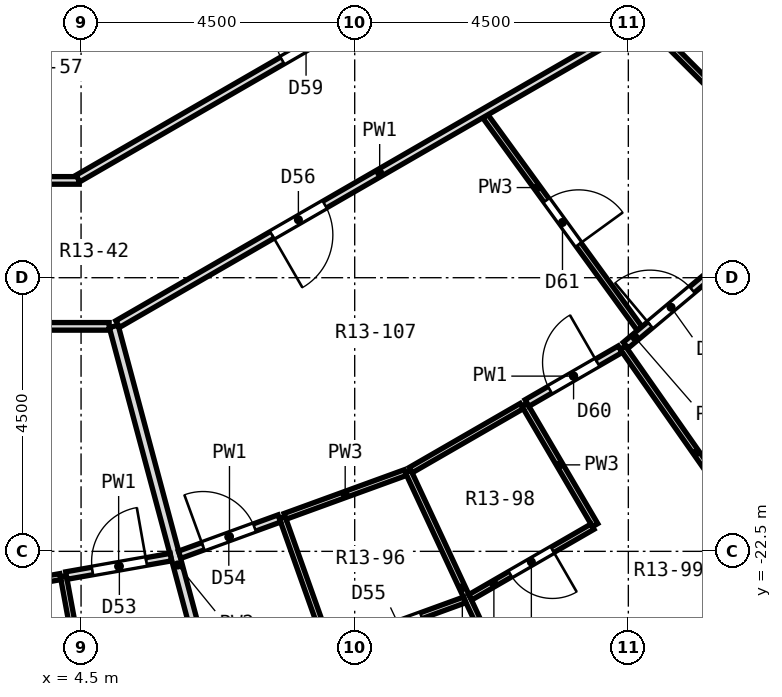
"""IFC4 building model, lengths in metres.
Left out: names, types, materials, properties, quantities, classifications, styles, units other than length and angle.
Written with IfcOpenShell. Run it as: python <this file> out.ifc"""

import sys

from ifc_helpers import new_model, si_unit, direction, frame, frame_2d, origin, place, context, subcontext, project, spatial, rectangle, extrude, element, fill, save


model = new_model("IFC4")
c1 = context("Model", 3, precision=1e-05, world=origin(), true_north=direction((0.0, 1.0)))
c2 = subcontext(c1, "Body", "Model", "MODEL_VIEW")
j1 = project(units=[si_unit("LENGTHUNIT", "METRE"), si_unit("PLANEANGLEUNIT", "RADIAN")], contexts=[c1])
p1 = place(None, origin())
s1 = spatial("IfcSite", under=j1, at=p1, CompositionType="ELEMENT")
p2 = place(p1, origin())
s2 = spatial("IfcBuilding", under=s1, at=p2, CompositionType="ELEMENT")
p3 = place(p2, frame((0.0, 0.0, 65.9)))
s3 = spatial("IfcBuildingStorey", under=s2, at=p3, CompositionType="ELEMENT", Elevation=65.9)
p4 = place(p3, frame((12.63, -25.721, 0.0), z_axis=(0.0, 0.0, 1.0), x_axis=(0.86603124159, 0.499989888488, 0.0)))
e1 = element("IfcWall", 1, at=p4, inside=s3, PredefinedType="SOLIDWALL", context=c2, shape_type="SweptSolid", body=[
    extrude(rectangle(XDim=3.846, YDim=0.6, at=frame_2d((1.923, 0.0))), origin(), (0.0, 0.0, 1.0), 2.75),
])
p5 = place(p4, frame((0.723, 0.0, 0.9)))
e2 = element("IfcOpeningElement", 2, at=p5, cuts=e1, PredefinedType="OPENING", context=c2, shape_type="SweptSolid", body=[
    extrude(rectangle(XDim=2.4, YDim=1.8, at=frame_2d((1.2, 0.9))), frame((0.0, 0.312, 0.0), z_axis=(0.0, -1.0, 0.0), x_axis=(1.0, 0.0, 0.0)), (0.0, 0.0, 1.0), 0.624),
])
p6 = place(p3, frame((4.209, -22.907, 0.0), z_axis=(0.0, 0.0, 1.0), x_axis=(0.180884135875, -0.983504412491, 0.0)))
e3 = element("IfcWall", 3, at=p6, inside=s3, PredefinedType="PARTITIONING", context=c2, shape_type="SweptSolid", body=[
    extrude(rectangle(XDim=2.3, YDim=0.1, at=frame_2d((1.15, 0.0))), origin(), (0.0, 0.0, 1.0), 2.75),
])
p7 = place(p3, frame((5.037, -18.8, 0.0), z_axis=(0.0, 0.0, 1.0), x_axis=(0.258808663505, -0.96592860797, 0.0)))
e4 = element("IfcWall", 4, at=p7, inside=s3, PredefinedType="PARTITIONING", context=c2, shape_type="SweptSolid", body=[
    extrude(rectangle(XDim=8.127, YDim=0.15, at=frame_2d((4.063, 0.0))), origin(), (0.0, 0.0, 1.0), 2.75),
])
p8 = place(p3, frame((7.808, -21.942, 0.0), z_axis=(0.0, 0.0, 1.0), x_axis=(0.335206501266, -0.942144681835, 0.0)))
e5 = element("IfcWall", 5, at=p8, inside=s3, PredefinedType="PARTITIONING", context=c2, shape_type="SweptSolid", body=[
    extrude(rectangle(XDim=2.3, YDim=0.1, at=frame_2d((1.15, 0.0))), origin(), (0.0, 0.0, 1.0), 2.75),
])
p9 = place(p3, frame((9.88, -21.188, 0.0), z_axis=(0.0, 0.0, 1.0), x_axis=(0.422631582156, -0.906301575506, 0.0)))
e6 = element("IfcWall", 6, at=p9, inside=s3, PredefinedType="PARTITIONING", context=c2, shape_type="SweptSolid", body=[
    extrude(rectangle(XDim=4.212, YDim=0.1, at=frame_2d((2.106, 0.0))), origin(), (0.0, 0.0, 1.0), 2.75),
])
p10 = place(p3, frame((11.79, -20.086, 0.0), z_axis=(0.0, 0.0, 1.0), x_axis=(0.506212585002, -0.862408730699, 0.0)))
e7 = element("IfcWall", 7, at=p10, inside=s3, PredefinedType="PARTITIONING", context=c2, shape_type="SweptSolid", body=[
    extrude(rectangle(XDim=2.3, YDim=0.1, at=frame_2d((1.15, 0.0))), origin(), (0.0, 0.0, 1.0), 2.75),
])
p11 = place(p3, frame((13.409, -19.151, 0.0), z_axis=(0.0, 0.0, 1.0), x_axis=(0.573446781639, -0.819242814206, 0.0)))
e8 = element("IfcWall", 8, at=p11, inside=s3, PredefinedType="PARTITIONING", context=c2, shape_type="SweptSolid", body=[
    extrude(rectangle(XDim=4.211, YDim=0.1, at=frame_2d((2.106, 0.0))), origin(), (0.0, 0.0, 1.0), 2.75),
])
p12 = place(p3, frame((11.148, -15.344, 0.0), z_axis=(0.0, 0.0, 1.0), x_axis=(0.587899330934, -0.8089340991, 0.0)))
e9 = element("IfcWall", 9, at=p12, inside=s3, PredefinedType="PARTITIONING", context=c2, shape_type="SweptSolid", body=[
    extrude(rectangle(XDim=4.318, YDim=0.1, at=frame_2d((2.159, 0.0))), origin(), (0.0, 0.0, 1.0), 2.75),
])
p13 = place(p12, frame((1.709, 0.0, 0.0)))
e10 = element("IfcOpeningElement", 10, at=p13, cuts=e9, PredefinedType="OPENING", context=c2, shape_type="SweptSolid", body=[
    extrude(rectangle(XDim=0.9, YDim=2.1, at=frame_2d((0.45, 1.05))), frame((0.0, 0.062, 0.0), z_axis=(0.0, -1.0, 0.0), x_axis=(1.0, 0.0, 0.0)), (0.0, 0.0, 1.0), 0.124),
])
p14 = place(p3, frame((13.763, -13.763, 0.0), z_axis=(0.0, 0.0, 1.0), x_axis=(0.707106781187, -0.707106781187, 0.0)))
e11 = element("IfcWall", 11, at=p14, inside=s3, PredefinedType="PARTITIONING", context=c2, shape_type="SweptSolid", body=[
    extrude(rectangle(XDim=2.174, YDim=0.1, at=frame_2d((1.087, 0.0))), origin(), (0.0, 0.0, 1.0), 2.75),
])
p15 = place(p3, frame((-4.975, -18.8, 0.0), z_axis=(0.0, 0.0, 1.0), x_axis=(1.0, 0.0, 0.0)))
e12 = element("IfcWall", 12, at=p15, inside=s3, PredefinedType="PARTITIONING", context=c2, shape_type="SweptSolid", body=[
    extrude(rectangle(XDim=9.937, YDim=0.125, at=frame_2d((4.968, 0.0))), origin(), (0.0, 0.0, 1.0), 2.75),
])
p16 = place(p3, frame((-4.332, -16.4, 0.0), z_axis=(0.0, 0.0, 1.0), x_axis=(1.0, 0.0, 0.0)))
e13 = element("IfcWall", 13, at=p16, inside=s3, PredefinedType="PARTITIONING", context=c2, shape_type="SweptSolid", body=[
    extrude(rectangle(XDim=8.798, YDim=0.125, at=frame_2d((4.399, 0.0))), origin(), (0.0, 0.0, 1.0), 2.75),
])
p17 = place(p16, frame((2.402, 0.0, 0.0)))
e14 = element("IfcOpeningElement", 14, at=p17, cuts=e13, PredefinedType="OPENING", context=c2, shape_type="SweptSolid", body=[
    extrude(rectangle(XDim=0.9, YDim=2.1, at=frame_2d((0.45, 1.05))), frame((0.0, 0.074, 0.0), z_axis=(0.0, -1.0, 0.0), x_axis=(1.0, 0.0, 0.0)), (0.0, 0.0, 1.0), 0.149),
])
p18 = place(p3, frame((2.087, -23.281, 0.0), z_axis=(0.0, 0.0, 1.0), x_axis=(0.984804573467, 0.173666208797, 0.0)))
e15 = element("IfcWall", 15, at=p18, inside=s3, PredefinedType="PARTITIONING", context=c2, shape_type="SweptSolid", body=[
    extrude(rectangle(XDim=2.104, YDim=0.1, at=frame_2d((1.052, 0.0))), origin(), (0.0, 0.0, 1.0), 2.75),
])
p19 = place(p3, frame((4.258, -22.898, 0.0), z_axis=(0.0, 0.0, 1.0), x_axis=(0.984792007097, 0.173737453525, 0.0)))
e16 = element("IfcWall", 16, at=p19, inside=s3, PredefinedType="PARTITIONING", context=c2, shape_type="SweptSolid", body=[
    extrude(rectangle(XDim=1.745, YDim=0.125, at=frame_2d((0.873, 0.0))), origin(), (0.0, 0.0, 1.0), 2.75),
])
p20 = place(p19, frame((0.435, 0.0, 0.0)))
e17 = element("IfcOpeningElement", 17, at=p20, cuts=e16, PredefinedType="OPENING", context=c2, shape_type="SweptSolid", body=[
    extrude(rectangle(XDim=0.9, YDim=2.1, at=frame_2d((0.45, 1.05))), frame((0.0, 0.074, 0.0), z_axis=(0.0, -1.0, 0.0), x_axis=(1.0, 0.0, 0.0)), (0.0, 0.0, 1.0), 0.149),
])
p21 = place(p3, frame((8.626, -24.092, 0.0), z_axis=(0.0, 0.0, 1.0), x_axis=(0.939814902169, 0.341683990936, 0.0)))
e18 = element("IfcWall", 18, at=p21, inside=s3, PredefinedType="PARTITIONING", context=c2, shape_type="SweptSolid", body=[
    extrude(rectangle(XDim=2.323, YDim=0.1, at=frame_2d((1.162, 0.0))), origin(), (0.0, 0.0, 1.0), 2.75),
])
p22 = place(p21, frame((0.761, 0.0, 0.0)))
e19 = element("IfcOpeningElement", 19, at=p22, cuts=e18, PredefinedType="OPENING", context=c2, shape_type="SweptSolid", body=[
    extrude(rectangle(XDim=0.8, YDim=2.1, at=frame_2d((0.4, 1.05))), frame((0.0, 0.062, 0.0), z_axis=(0.0, -1.0, 0.0), x_axis=(1.0, 0.0, 0.0)), (0.0, 0.0, 1.0), 0.124),
])
p23 = place(p3, frame((7.855, -21.925, 0.0), z_axis=(0.0, 0.0, 1.0), x_axis=(0.939725675468, 0.341929312674, 0.0)))
e20 = element("IfcWall", 20, at=p23, inside=s3, PredefinedType="PARTITIONING", context=c2, shape_type="SweptSolid", body=[
    extrude(rectangle(XDim=2.105, YDim=0.1, at=frame_2d((1.052, 0.0))), origin(), (0.0, 0.0, 1.0), 2.75),
])
p24 = place(p3, frame((6.122, -22.556, 0.0), z_axis=(0.0, 0.0, 1.0), x_axis=(0.939605351125, 0.342259819635, 0.0)))
e21 = element("IfcWall", 21, at=p24, inside=s3, PredefinedType="PARTITIONING", context=c2, shape_type="SweptSolid", body=[
    extrude(rectangle(XDim=1.745, YDim=0.125, at=frame_2d((0.873, 0.0))), origin(), (0.0, 0.0, 1.0), 2.75),
])
p25 = place(p24, frame((0.41, 0.0, 0.0)))
e22 = element("IfcOpeningElement", 22, at=p25, cuts=e21, PredefinedType="OPENING", context=c2, shape_type="SweptSolid", body=[
    extrude(rectangle(XDim=0.9, YDim=2.1, at=frame_2d((0.45, 1.05))), frame((0.0, 0.074, 0.0), z_axis=(0.0, -1.0, 0.0), x_axis=(1.0, 0.0, 0.0)), (0.0, 0.0, 1.0), 0.149),
])
p26 = place(p3, frame((10.899, -23.256, 0.0), z_axis=(0.0, 0.0, 1.0), x_axis=(0.865852932048, 0.500298610895, 0.0)))
e23 = element("IfcWall", 23, at=p26, inside=s3, PredefinedType="PARTITIONING", context=c2, shape_type="SweptSolid", body=[
    extrude(rectangle(XDim=2.323, YDim=0.1, at=frame_2d((1.161, 0.0))), origin(), (0.0, 0.0, 1.0), 2.75),
])
p27 = place(p26, frame((0.761, 0.0, 0.0)))
e24 = element("IfcOpeningElement", 24, at=p27, cuts=e23, PredefinedType="OPENING", context=c2, shape_type="SweptSolid", body=[
    extrude(rectangle(XDim=0.8, YDim=2.1, at=frame_2d((0.4, 1.05))), frame((0.0, 0.062, 0.0), z_axis=(0.0, -1.0, 0.0), x_axis=(1.0, 0.0, 0.0)), (0.0, 0.0, 1.0), 0.124),
])
p28 = place(p3, frame((9.923, -21.163, 0.0), z_axis=(0.0, 0.0, 1.0), x_axis=(0.866158552195, 0.499769309241, 0.0)))
e25 = element("IfcWall", 25, at=p28, inside=s3, PredefinedType="PARTITIONING", context=c2, shape_type="SweptSolid", body=[
    extrude(rectangle(XDim=2.105, YDim=0.1, at=frame_2d((1.052, 0.0))), origin(), (0.0, 0.0, 1.0), 2.75),
])
p29 = place(p3, frame((11.833, -20.061, 0.0), z_axis=(0.0, 0.0, 1.0), x_axis=(0.865967311171, 0.500100605862, 0.0)))
e26 = element("IfcWall", 26, at=p29, inside=s3, PredefinedType="PARTITIONING", context=c2, shape_type="SweptSolid", body=[
    extrude(rectangle(XDim=1.77, YDim=0.125, at=frame_2d((0.885, 0.0))), origin(), (0.0, 0.0, 1.0), 2.75),
])
p30 = place(p29, frame((0.435, 0.0, 0.0)))
e27 = element("IfcOpeningElement", 27, at=p30, cuts=e26, PredefinedType="OPENING", context=c2, shape_type="SweptSolid", body=[
    extrude(rectangle(XDim=0.9, YDim=2.1, at=frame_2d((0.45, 1.05))), frame((0.0, 0.074, 0.0), z_axis=(0.0, -1.0, 0.0), x_axis=(1.0, 0.0, 0.0)), (0.0, 0.0, 1.0), 0.149),
])
p31 = place(p3, frame((5.102, -18.762, 0.0), z_axis=(0.0, 0.0, 1.0), x_axis=(0.866071189182, 0.499920688979, 0.0)))
e28 = element("IfcWall", 28, at=p31, inside=s3, PredefinedType="PARTITIONING", context=c2, shape_type="SweptSolid", body=[
    extrude(rectangle(XDim=9.95, YDim=0.125, at=frame_2d((4.975, 0.0))), origin(), (0.0, 0.0, 1.0), 2.75),
])
p32 = place(p31, frame((2.932, 0.0, 0.0)))
e29 = element("IfcOpeningElement", 29, at=p32, cuts=e28, PredefinedType="OPENING", context=c2, shape_type="SweptSolid", body=[
    extrude(rectangle(XDim=1.0, YDim=2.1, at=frame_2d((0.5, 1.05))), frame((0.0, 0.074, 0.0), z_axis=(0.0, -1.0, 0.0), x_axis=(1.0, 0.0, 0.0)), (0.0, 0.0, 1.0), 0.149),
])
p33 = place(p3, frame((4.448, -16.369, 0.0), z_axis=(0.0, 0.0, 1.0), x_axis=(0.866072505035, 0.499918409365, 0.0)))
e30 = element("IfcWall", 30, at=p33, inside=s3, PredefinedType="PARTITIONING", context=c2, shape_type="SweptSolid", body=[
    extrude(rectangle(XDim=8.664, YDim=0.125, at=frame_2d((4.332, 0.0))), origin(), (0.0, 0.0, 1.0), 2.75),
])
p34 = place(p33, frame((3.882, 0.0, 0.0)))
e31 = element("IfcOpeningElement", 31, at=p34, cuts=e30, PredefinedType="OPENING", context=c2, shape_type="SweptSolid", body=[
    extrude(rectangle(XDim=0.9, YDim=2.1, at=frame_2d((0.45, 1.05))), frame((0.0, 0.074, 0.0), z_axis=(0.0, -1.0, 0.0), x_axis=(1.0, 0.0, 0.0)), (0.0, 0.0, 1.0), 0.149),
])
p35 = place(p3, frame((13.457, -19.111, 0.0), z_axis=(0.0, 0.0, 1.0), x_axis=(0.766590701723, 0.642136041686, 0.0)))
e32 = element("IfcWall", 32, at=p35, inside=s3, PredefinedType="PARTITIONING", context=c2, shape_type="SweptSolid", body=[
    extrude(rectangle(XDim=1.758, YDim=0.125, at=frame_2d((0.879, 0.0))), origin(), (0.0, 0.0, 1.0), 2.75),
])
p36 = place(p35, frame((0.523, 0.0, 0.0)))
e33 = element("IfcOpeningElement", 33, at=p36, cuts=e32, PredefinedType="OPENING", context=c2, shape_type="SweptSolid", body=[
    extrude(rectangle(XDim=0.9, YDim=2.1, at=frame_2d((0.45, 1.05))), frame((0.0, 0.074, 0.0), z_axis=(0.0, -1.0, 0.0), x_axis=(1.0, 0.0, 0.0)), (0.0, 0.0, 1.0), 0.149),
])
p37 = place(p20, origin())
e34 = element("IfcDoor", 34, at=p37, inside=s3, OperationType="SINGLE_SWING_RIGHT", PredefinedType="DOOR", context=c2, shape_type="SweptSolid", body=[
    extrude(rectangle(XDim=0.9, YDim=2.1, at=frame_2d((0.45, 1.05))), frame((0.0, 0.025, 0.0), z_axis=(0.0, -1.0, 0.0), x_axis=(1.0, 0.0, 0.0)), (0.0, 0.0, 1.0), 0.05),
])
fill(e17, e34)
p38 = place(p25, origin())
e35 = element("IfcDoor", 35, at=p38, inside=s3, OperationType="SINGLE_SWING_LEFT", PredefinedType="DOOR", context=c2, shape_type="SweptSolid", body=[
    extrude(rectangle(XDim=0.9, YDim=2.1, at=frame_2d((0.45, 1.05))), frame((0.0, 0.025, 0.0), z_axis=(0.0, -1.0, 0.0), x_axis=(1.0, 0.0, 0.0)), (0.0, 0.0, 1.0), 0.05),
])
fill(e22, e35)
p39 = place(p22, frame((0.8, 0.0, 0.0), z_axis=(0.0, 0.0, 1.0), x_axis=(-1.0, 0.0, 0.0)))
e36 = element("IfcDoor", 36, at=p39, inside=s3, OperationType="SINGLE_SWING_RIGHT", PredefinedType="DOOR", context=c2, shape_type="SweptSolid", body=[
    extrude(rectangle(XDim=0.8, YDim=2.1, at=frame_2d((0.4, 1.05))), frame((0.0, 0.025, 0.0), z_axis=(0.0, -1.0, 0.0), x_axis=(1.0, 0.0, 0.0)), (0.0, 0.0, 1.0), 0.05),
])
fill(e19, e36)
p40 = place(p32, frame((1.0, 0.0, 0.0), z_axis=(0.0, 0.0, 1.0), x_axis=(-1.0, 0.0, 0.0)))
e37 = element("IfcDoor", 37, at=p40, inside=s3, OperationType="SINGLE_SWING_RIGHT", PredefinedType="DOOR", context=c2, shape_type="SweptSolid", body=[
    extrude(rectangle(XDim=1.0, YDim=2.1, at=frame_2d((0.5, 1.05))), frame((0.0, 0.025, 0.0), z_axis=(0.0, -1.0, 0.0), x_axis=(1.0, 0.0, 0.0)), (0.0, 0.0, 1.0), 0.05),
])
fill(e29, e37)
p41 = place(p27, frame((0.8, 0.0, 0.0), z_axis=(0.0, 0.0, 1.0), x_axis=(-1.0, 0.0, 0.0)))
e38 = element("IfcDoor", 38, at=p41, inside=s3, OperationType="SINGLE_SWING_LEFT", PredefinedType="DOOR", context=c2, shape_type="SweptSolid", body=[
    extrude(rectangle(XDim=0.8, YDim=2.1, at=frame_2d((0.4, 1.05))), frame((0.0, 0.025, 0.0), z_axis=(0.0, -1.0, 0.0), x_axis=(1.0, 0.0, 0.0)), (0.0, 0.0, 1.0), 0.05),
])
fill(e24, e38)
p42 = place(p34, origin())
e39 = element("IfcDoor", 39, at=p42, inside=s3, OperationType="SINGLE_SWING_RIGHT", PredefinedType="DOOR", context=c2, shape_type="SweptSolid", body=[
    extrude(rectangle(XDim=0.9, YDim=2.1, at=frame_2d((0.45, 1.05))), frame((0.0, 0.025, 0.0), z_axis=(0.0, -1.0, 0.0), x_axis=(1.0, 0.0, 0.0)), (0.0, 0.0, 1.0), 0.05),
])
fill(e31, e39)
p43 = place(p30, origin())
e40 = element("IfcDoor", 40, at=p43, inside=s3, OperationType="SINGLE_SWING_RIGHT", PredefinedType="DOOR", context=c2, shape_type="SweptSolid", body=[
    extrude(rectangle(XDim=0.9, YDim=2.1, at=frame_2d((0.45, 1.05))), frame((0.0, 0.025, 0.0), z_axis=(0.0, -1.0, 0.0), x_axis=(1.0, 0.0, 0.0)), (0.0, 0.0, 1.0), 0.05),
])
fill(e27, e40)
p44 = place(p13, origin())
e41 = element("IfcDoor", 41, at=p44, inside=s3, OperationType="SINGLE_SWING_RIGHT", PredefinedType="DOOR", context=c2, shape_type="SweptSolid", body=[
    extrude(rectangle(XDim=0.9, YDim=2.1, at=frame_2d((0.45, 1.05))), frame((0.0, 0.025, 0.0), z_axis=(0.0, -1.0, 0.0), x_axis=(1.0, 0.0, 0.0)), (0.0, 0.0, 1.0), 0.05),
])
fill(e10, e41)
p45 = place(p36, origin())
e42 = element("IfcDoor", 42, at=p45, inside=s3, OperationType="SINGLE_SWING_LEFT", PredefinedType="DOOR", context=c2, shape_type="SweptSolid", body=[
    extrude(rectangle(XDim=0.9, YDim=2.1, at=frame_2d((0.45, 1.05))), frame((0.0, 0.025, 0.0), z_axis=(0.0, -1.0, 0.0), x_axis=(1.0, 0.0, 0.0)), (0.0, 0.0, 1.0), 0.05),
])
fill(e33, e42)
save(model, sys.argv[1])
